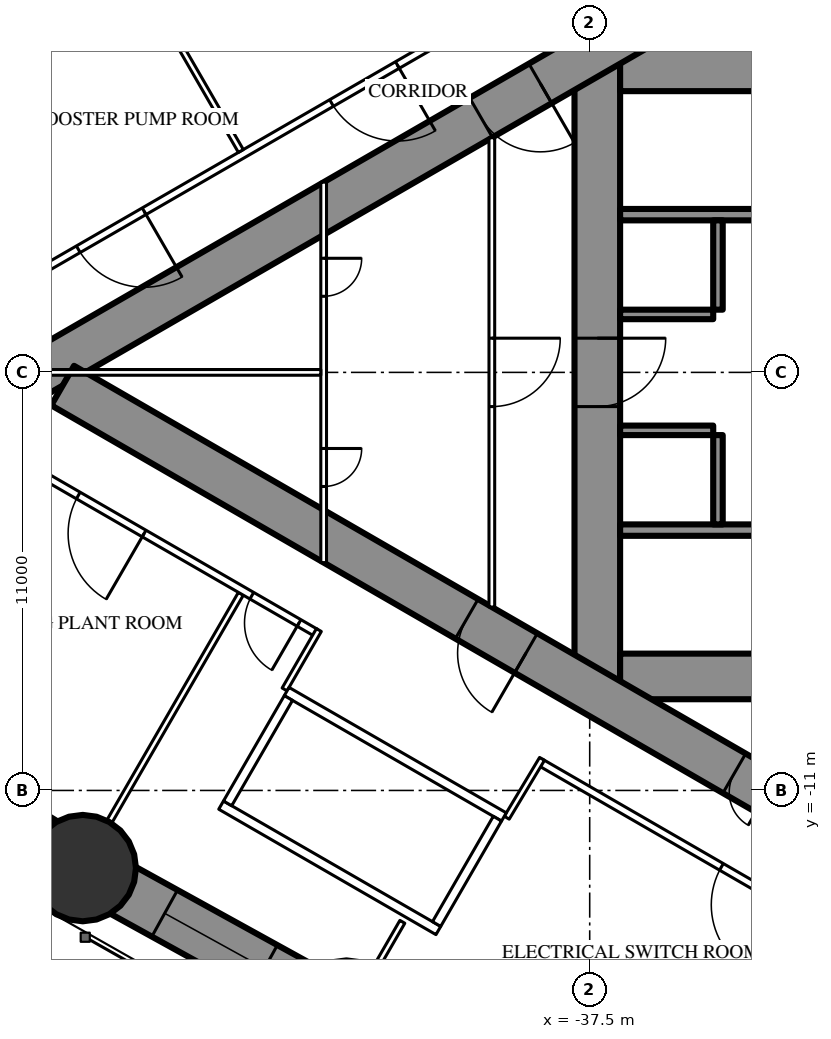
"""IFC4 building model, lengths in metres.
Left out: names, types, materials, properties, quantities, classifications, styles, units other than length and angle.
Written with IfcOpenShell. Run it as: python <this file> out.ifc"""

import sys

from ifc_helpers import new_model, si_unit, direction, frame, frame_2d, origin, origin_2d, place, context, subcontext, project, spatial, rectangle, circle, extrude, element, fill, save


model = new_model("IFC4")
c1 = context("Model", 3, precision=1e-05, world=origin(), true_north=direction((0.0, 1.0)))
c2 = subcontext(c1, "Body", "Model", "MODEL_VIEW")
j1 = project(units=[si_unit("LENGTHUNIT", "METRE"), si_unit("PLANEANGLEUNIT", "RADIAN")], contexts=[c1])
p1 = place(None, origin())
s1 = spatial("IfcSite", under=j1, at=p1, CompositionType="ELEMENT")
p2 = place(p1, origin())
s2 = spatial("IfcBuilding", under=s1, at=p2, CompositionType="ELEMENT")
p3 = place(p2, frame((0.0, 0.0, 201.8)))
s3 = spatial("IfcBuildingStorey", under=s2, at=p3, CompositionType="ELEMENT", Elevation=201.8)
p4 = place(p3, frame((-50.839, -13.043, 0.0), z_axis=(0.0, 0.0, 1.0), x_axis=(1.0, 0.0, 0.0)))
e1 = element("IfcColumn", 1, at=p4, inside=s3, PredefinedType="COLUMN", context=c2, shape_type="SweptSolid", body=[
    extrude(circle(Radius=1.4, at=origin_2d()), origin(), (0.0, 0.0, 1.0), 3.5),
])
p5 = place(p3, frame((-37.3, 8.6, 0.0), z_axis=(0.0, 0.0, 1.0), x_axis=(0.0, -1.0, 0.0)))
e2 = element("IfcWall", 2, at=p5, inside=s3, PredefinedType="SHEAR", context=c2, shape_type="SweptSolid", body=[
    extrude(rectangle(XDim=17.2, YDim=1.2, at=frame_2d((8.6, 0.0))), origin(), (0.0, 0.0, 1.0), 3.5),
])
p6 = place(p5, frame((7.7, 0.0, 0.0)))
e3 = element("IfcOpeningElement", 3, at=p6, cuts=e2, PredefinedType="OPENING", context=c2, shape_type="SweptSolid", body=[
    extrude(rectangle(XDim=1.8, YDim=2.2, at=frame_2d((0.9, 1.1))), frame((0.0, 0.61, 0.0), z_axis=(0.0, -1.0, 0.0), x_axis=(1.0, 0.0, 0.0)), (0.0, 0.0, 1.0), 1.22),
])
p7 = place(p3, frame((-28.3, 8.0, 0.0), z_axis=(0.0, 0.0, 1.0), x_axis=(-1.0, 0.0, 0.0)))
e4 = element("IfcWall", 4, at=p7, inside=s3, PredefinedType="SHEAR", context=c2, shape_type="SweptSolid", body=[
    extrude(rectangle(XDim=8.4, YDim=1.2, at=frame_2d((4.2, 0.0))), origin(), (0.0, 0.0, 1.0), 3.5),
])
p8 = place(p7, frame((0.25, 0.0, 0.0)))
e5 = element("IfcOpeningElement", 5, at=p8, cuts=e4, PredefinedType="OPENING", context=c2, shape_type="SweptSolid", body=[
    extrude(rectangle(XDim=1.0, YDim=2.2, at=frame_2d((0.5, 1.1))), frame((0.0, 0.61, 0.0), z_axis=(0.0, -1.0, 0.0), x_axis=(1.0, 0.0, 0.0)), (0.0, 0.0, 1.0), 1.22),
])
p9 = place(p3, frame((-28.3, -8.0, 0.0), z_axis=(0.0, 0.0, 1.0), x_axis=(-1.0, 0.0, 0.0)))
e6 = element("IfcWall", 6, at=p9, inside=s3, PredefinedType="SHEAR", context=c2, shape_type="SweptSolid", body=[
    extrude(rectangle(XDim=8.4, YDim=1.2, at=frame_2d((4.2, 0.0))), origin(), (0.0, 0.0, 1.0), 3.5),
])
p10 = place(p9, frame((0.25, 0.0, 0.0)))
e7 = element("IfcOpeningElement", 7, at=p10, cuts=e6, PredefinedType="OPENING", context=c2, shape_type="SweptSolid", body=[
    extrude(rectangle(XDim=1.0, YDim=2.2, at=frame_2d((0.5, 1.1))), frame((0.0, 0.61, 0.0), z_axis=(0.0, -1.0, 0.0), x_axis=(1.0, 0.0, 0.0)), (0.0, 0.0, 1.0), 1.22),
])
for number, where, z_axis, x_axis in (
    (8, (-28.3, 4.15, 0.0), (0.0, 0.0, 1.0), (-1.0, 0.0, 0.0)),
    (9, (-28.3, -4.15, 0.0), (0.0, 0.0, 1.0), (-1.0, 0.0, 0.0)),
):
    element("IfcWall", number, at=place(p3, frame(where, z_axis=z_axis, x_axis=x_axis)), inside=s3, PredefinedType="SHEAR", context=c2, shape_type="SweptSolid", body=[
        extrude(rectangle(XDim=8.4, YDim=0.3, at=frame_2d((4.2, 0.0))), origin(), (0.0, 0.0, 1.0), 3.5),
    ])
p11 = place(p3, frame((-34.125, 4.0, 0.0), z_axis=(0.0, 0.0, 1.0), x_axis=(0.0, -1.0, 0.0)))
e10 = element("IfcWall", 10, at=p11, inside=s3, PredefinedType="SHEAR", context=c2, shape_type="SweptSolid", body=[
    extrude(rectangle(XDim=2.35, YDim=0.25, at=frame_2d((1.175, 0.0))), origin(), (0.0, 0.0, 1.0), 3.5),
])
p12 = place(p3, frame((-34.25, 1.525, 0.0), z_axis=(0.0, 0.0, 1.0), x_axis=(-1.0, 0.0, 0.0)))
e11 = element("IfcWall", 11, at=p12, inside=s3, PredefinedType="SHEAR", context=c2, shape_type="SweptSolid", body=[
    extrude(rectangle(XDim=2.45, YDim=0.25, at=frame_2d((1.225, 0.0))), origin(), (0.0, 0.0, 1.0), 3.5),
])
p13 = place(p3, frame((-34.125, -1.65, 0.0), z_axis=(0.0, 0.0, 1.0), x_axis=(0.0, -1.0, 0.0)))
e12 = element("IfcWall", 12, at=p13, inside=s3, PredefinedType="SHEAR", context=c2, shape_type="SweptSolid", body=[
    extrude(rectangle(XDim=2.35, YDim=0.25, at=frame_2d((1.175, 0.0))), origin(), (0.0, 0.0, 1.0), 3.5),
])
p14 = place(p3, frame((-34.25, -1.525, 0.0), z_axis=(0.0, 0.0, 1.0), x_axis=(-1.0, 0.0, 0.0)))
e13 = element("IfcWall", 13, at=p14, inside=s3, PredefinedType="SHEAR", context=c2, shape_type="SweptSolid", body=[
    extrude(rectangle(XDim=2.45, YDim=0.25, at=frame_2d((1.225, 0.0))), origin(), (0.0, 0.0, 1.0), 3.5),
])
p15 = place(p3, frame((-27.2, 14.3, 0.0), z_axis=(0.0, 0.0, 1.0), x_axis=(-0.866026593062, -0.499997940104, 0.0)))
e14 = element("IfcWall", 14, at=p15, inside=s3, PredefinedType="SHEAR", context=c2, shape_type="SweptSolid", body=[
    extrude(rectangle(XDim=28.946, YDim=1.2, at=frame_2d((14.473, 0.0))), origin(), (0.0, 0.0, 1.0), 3.5),
])
p16 = place(p15, frame((6.5, 0.0, 0.0)))
e15 = element("IfcOpeningElement", 15, at=p16, cuts=e14, PredefinedType="OPENING", context=c2, shape_type="SweptSolid", body=[
    extrude(rectangle(XDim=1.0, YDim=2.2, at=frame_2d((0.5, 1.1))), frame((0.0, 0.61, 0.0), z_axis=(0.0, -1.0, 0.0), x_axis=(1.0, 0.0, 0.0)), (0.0, 0.0, 1.0), 1.22),
])
p17 = place(p15, frame((13.395, 0.0, 0.0)))
e16 = element("IfcOpeningElement", 16, at=p17, cuts=e14, PredefinedType="OPENING", context=c2, shape_type="SweptSolid", body=[
    extrude(rectangle(XDim=1.8, YDim=2.03, at=frame_2d((0.9, 1.015))), frame((0.0, 0.61, 0.0), z_axis=(0.0, -1.0, 0.0), x_axis=(1.0, 0.0, 0.0)), (0.0, 0.0, 1.0), 1.22),
])
p18 = place(p3, frame((-27.2, -14.3, 0.0), z_axis=(0.0, 0.0, 1.0), x_axis=(-0.866024021859, 0.500002393557, 0.0)))
e17 = element("IfcWall", 17, at=p18, inside=s3, PredefinedType="SHEAR", context=c2, shape_type="SweptSolid", body=[
    extrude(rectangle(XDim=27.907, YDim=1.2, at=frame_2d((13.954, 0.0))), origin(), (0.0, 0.0, 1.0), 3.5),
])
p19 = place(p18, frame((6.5, 0.0, 0.0)))
e18 = element("IfcOpeningElement", 18, at=p19, cuts=e17, PredefinedType="OPENING", context=c2, shape_type="SweptSolid", body=[
    extrude(rectangle(XDim=1.0, YDim=2.2, at=frame_2d((0.5, 1.1))), frame((0.0, 0.61, 0.0), z_axis=(0.0, -1.0, 0.0), x_axis=(1.0, 0.0, 0.0)), (0.0, 0.0, 1.0), 1.22),
])
p20 = place(p18, frame((13.829, 0.0, 0.0)))
e19 = element("IfcOpeningElement", 19, at=p20, cuts=e17, PredefinedType="OPENING", context=c2, shape_type="SweptSolid", body=[
    extrude(rectangle(XDim=1.8, YDim=2.2, at=frame_2d((0.9, 1.1))), frame((0.0, 0.61, 0.0), z_axis=(0.0, -1.0, 0.0), x_axis=(1.0, 0.0, 0.0)), (0.0, 0.0, 1.0), 1.22),
])
p21 = place(p3, frame((-50.839, 13.043, 0.0), z_axis=(0.0, 0.0, 1.0), x_axis=(-0.851892008043, -0.523717487423, 0.0)))
e20 = element("IfcWall", 20, at=p21, inside=s3, PredefinedType="SHEAR", context=c2, shape_type="SweptSolid", body=[
    extrude(rectangle(XDim=7.924, YDim=1.4, at=frame_2d((3.962, 0.0))), origin(), (0.0, 0.0, 1.0), 3.5),
])
p22 = place(p21, frame((2.462, 0.0, 0.6)))
e21 = element("IfcOpeningElement", 21, at=p22, cuts=e20, PredefinedType="OPENING", context=c2, shape_type="SweptSolid", body=[
    extrude(rectangle(XDim=3.0, YDim=1.2, at=frame_2d((1.5, 0.6))), frame((0.0, 0.71, 0.0), z_axis=(0.0, -1.0, 0.0), x_axis=(1.0, 0.0, 0.0)), (0.0, 0.0, 1.0), 1.42),
])
p23 = place(p3, frame((-57.59, -8.893, 0.0), z_axis=(0.0, 0.0, 1.0), x_axis=(0.851892008043, -0.523717487423, 0.0)))
e22 = element("IfcWall", 22, at=p23, inside=s3, PredefinedType="SHEAR", context=c2, shape_type="SweptSolid", body=[
    extrude(rectangle(XDim=7.924, YDim=1.4, at=frame_2d((3.962, 0.0))), origin(), (0.0, 0.0, 1.0), 3.5),
])
p24 = place(p23, frame((2.462, 0.0, 0.6)))
e23 = element("IfcOpeningElement", 23, at=p24, cuts=e22, PredefinedType="OPENING", context=c2, shape_type="SweptSolid", body=[
    extrude(rectangle(XDim=3.0, YDim=1.2, at=frame_2d((1.5, 0.6))), frame((0.0, 0.71, 0.0), z_axis=(0.0, -1.0, 0.0), x_axis=(1.0, 0.0, 0.0)), (0.0, 0.0, 1.0), 1.42),
])
p25 = place(p3, frame((-50.839, -13.043, 0.0), z_axis=(0.0, 0.0, 1.0), x_axis=(0.875577684027, -0.483077342911, 0.0)))
e24 = element("IfcWall", 24, at=p25, inside=s3, PredefinedType="SHEAR", context=c2, shape_type="SweptSolid", body=[
    extrude(rectangle(XDim=7.925, YDim=1.4, at=frame_2d((3.962, 0.0))), origin(), (0.0, 0.0, 1.0), 3.5),
])
p26 = place(p25, frame((2.462, 0.0, 0.6)))
e25 = element("IfcOpeningElement", 25, at=p26, cuts=e24, PredefinedType="OPENING", context=c2, shape_type="SweptSolid", body=[
    extrude(rectangle(XDim=3.0, YDim=1.2, at=frame_2d((1.5, 0.6))), frame((0.0, 0.71, 0.0), z_axis=(0.0, -1.0, 0.0), x_axis=(1.0, 0.0, 0.0)), (0.0, 0.0, 1.0), 1.42),
])
p27 = place(p3, frame((-27.803, 16.608, 0.0), z_axis=(0.0, 0.0, 1.0), x_axis=(-0.866025851808, -0.499999223999, 0.0)))
e26 = element("IfcWall", 26, at=p27, inside=s3, PredefinedType="PARTITIONING", context=c2, shape_type="SweptSolid", body=[
    extrude(rectangle(XDim=33.215, YDim=0.2, at=frame_2d((16.608, 0.0))), origin(), (0.0, 0.0, 1.0), 3.25),
])
p28 = place(p27, frame((5.584, 0.0, 0.0)))
e27 = element("IfcOpeningElement", 27, at=p28, cuts=e26, PredefinedType="OPENING", context=c2, shape_type="SweptSolid", body=[
    extrude(rectangle(XDim=2.0, YDim=2.4, at=frame_2d((1.0, 1.2))), frame((0.0, 0.11, 0.0), z_axis=(0.0, -1.0, 0.0), x_axis=(1.0, 0.0, 0.0)), (0.0, 0.0, 1.0), 0.22),
])
p29 = place(p27, frame((17.04, 0.0, 0.0)))
e28 = element("IfcOpeningElement", 28, at=p29, cuts=e26, PredefinedType="OPENING", context=c2, shape_type="SweptSolid", body=[
    extrude(rectangle(XDim=2.0, YDim=2.4, at=frame_2d((1.0, 1.2))), frame((0.0, 0.11, 0.0), z_axis=(0.0, -1.0, 0.0), x_axis=(1.0, 0.0, 0.0)), (0.0, 0.0, 1.0), 0.22),
])
p30 = place(p27, frame((24.735, 0.0, 0.0)))
e29 = element("IfcOpeningElement", 29, at=p30, cuts=e26, PredefinedType="OPENING", context=c2, shape_type="SweptSolid", body=[
    extrude(rectangle(XDim=2.0, YDim=2.4, at=frame_2d((1.0, 1.2))), frame((0.0, 0.11, 0.0), z_axis=(0.0, -1.0, 0.0), x_axis=(1.0, 0.0, 0.0)), (0.0, 0.0, 1.0), 0.22),
])
p31 = place(p27, frame((30.361, 0.0, 0.0)))
e30 = element("IfcOpeningElement", 30, at=p31, cuts=e26, PredefinedType="OPENING", context=c2, shape_type="SweptSolid", body=[
    extrude(rectangle(XDim=2.0, YDim=2.03, at=frame_2d((1.0, 1.015))), frame((0.0, 0.11, 0.0), z_axis=(0.0, -1.0, 0.0), x_axis=(1.0, 0.0, 0.0)), (0.0, 0.0, 1.0), 0.22),
])
for number, where, z_axis, x_axis in (
    (31, (-46.679, 5.825, 0.0), (0.0, 0.0, 1.0), (-0.5, 0.866, 0.0)),
    (32, (-46.679, -5.825, 0.0), (0.0, 0.0, 1.0), (-0.5, -0.866, 0.0)),
):
    element("IfcWall", number, at=place(p3, frame(where, z_axis=z_axis, x_axis=x_axis)), inside=s3, PredefinedType="PARTITIONING", context=c2, shape_type="SweptSolid", body=[
        extrude(rectangle(XDim=6.911, YDim=0.15, at=frame_2d((3.456, 0.0))), origin(), (0.0, 0.0, 1.0), 2.05),
    ])
p32 = place(p3, frame((-42.429, -14.457, 0.0), z_axis=(0.0, 0.0, 1.0), x_axis=(-0.5000578829, -0.865991982497, 0.0)))
e33 = element("IfcWall", 33, at=p32, inside=s3, PredefinedType="PARTITIONING", context=c2, shape_type="SweptSolid", body=[
    extrude(rectangle(XDim=1.407, YDim=0.15, at=frame_2d((0.704, 0.0))), origin(), (0.0, 0.0, 1.0), 3.25),
])
p33 = place(p3, frame((-27.803, -16.608, 0.0), z_axis=(0.0, 0.0, 1.0), x_axis=(-0.866028577512, 0.499994502903, 0.0)))
e34 = element("IfcWall", 34, at=p33, inside=s3, PredefinedType="PARTITIONING", context=c2, shape_type="SweptSolid", body=[
    extrude(rectangle(XDim=12.688, YDim=0.2, at=frame_2d((6.344, 0.0))), origin(), (0.0, 0.0, 1.0), 3.25),
])
p34 = place(p33, frame((5.194, 0.0, 0.0)))
e35 = element("IfcOpeningElement", 35, at=p34, cuts=e34, PredefinedType="OPENING", context=c2, shape_type="SweptSolid", body=[
    extrude(rectangle(XDim=2.0, YDim=2.4, at=frame_2d((1.0, 1.2))), frame((0.0, 0.11, 0.0), z_axis=(0.0, -1.0, 0.0), x_axis=(1.0, 0.0, 0.0)), (0.0, 0.0, 1.0), 0.22),
])
p35 = place(p3, frame((-44.715, -6.844, 0.0), z_axis=(0.0, 0.0, 1.0), x_axis=(-0.866025261224, 0.500000246922, 0.0)))
e36 = element("IfcWall", 36, at=p35, inside=s3, PredefinedType="PARTITIONING", context=c2, shape_type="SweptSolid", body=[
    extrude(rectangle(XDim=13.567, YDim=0.2, at=frame_2d((6.783, 0.0))), origin(), (0.0, 0.0, 1.0), 3.25),
])
p36 = place(p35, frame((10.773, 0.0, 0.0)))
e37 = element("IfcOpeningElement", 37, at=p36, cuts=e36, PredefinedType="OPENING", context=c2, shape_type="SweptSolid", body=[
    extrude(rectangle(XDim=2.0, YDim=2.03, at=frame_2d((1.0, 1.015))), frame((0.0, 0.11, 0.0), z_axis=(0.0, -1.0, 0.0), x_axis=(1.0, 0.0, 0.0)), (0.0, 0.0, 1.0), 0.22),
])
p37 = place(p35, frame((5.207, 0.0, 0.0)))
e38 = element("IfcOpeningElement", 38, at=p37, cuts=e36, PredefinedType="OPENING", context=c2, shape_type="SweptSolid", body=[
    extrude(rectangle(XDim=2.0, YDim=2.4, at=frame_2d((1.0, 1.2))), frame((0.0, 0.11, 0.0), z_axis=(0.0, -1.0, 0.0), x_axis=(1.0, 0.0, 0.0)), (0.0, 0.0, 1.0), 0.22),
])
p38 = place(p35, frame((0.5, 0.0, 0.0)))
e39 = element("IfcOpeningElement", 39, at=p38, cuts=e36, PredefinedType="OPENING", context=c2, shape_type="SweptSolid", body=[
    extrude(rectangle(XDim=1.435, YDim=2.03, at=frame_2d((0.718, 1.015))), frame((0.0, 0.11, 0.0), z_axis=(0.0, -1.0, 0.0), x_axis=(1.0, 0.0, 0.0)), (0.0, 0.0, 1.0), 0.22),
])
for number, where, z_axis, x_axis in (
    (40, (-44.626, -6.779, 0.0), (0.0, 0.0, 1.0), (-0.5, -0.866, 0.0)),
    (41, (-39.683, -11.718, 0.0), (0.0, 0.0, 1.0), (0.514, 0.858, 0.0)),
):
    element("IfcWall", number, at=place(p3, frame(where, z_axis=z_axis, x_axis=x_axis)), inside=s3, PredefinedType="PARTITIONING", context=c2, shape_type="SweptSolid", body=[
        extrude(rectangle(XDim=1.805, YDim=0.15, at=frame_2d((0.903, 0.0))), origin(), (0.0, 0.0, 1.0), 3.25),
    ])
p39 = place(p3, frame((-40.075, 6.174, 0.0), z_axis=(0.0, 0.0, 1.0), x_axis=(0.0, -1.0, 0.0)))
e42 = element("IfcWall", 42, at=p39, inside=s3, PredefinedType="PARTITIONING", context=c2, shape_type="SweptSolid", body=[
    extrude(rectangle(XDim=12.348, YDim=0.15, at=frame_2d((6.174, 0.0))), origin(), (0.0, 0.0, 1.0), 3.25),
])
p40 = place(p39, frame((5.274, 0.0, 0.0)))
e43 = element("IfcOpeningElement", 43, at=p40, cuts=e42, PredefinedType="OPENING", context=c2, shape_type="SweptSolid", body=[
    extrude(rectangle(XDim=1.8, YDim=2.2, at=frame_2d((0.9, 1.1))), frame((0.0, 0.085, 0.0), z_axis=(0.0, -1.0, 0.0), x_axis=(1.0, 0.0, 0.0)), (0.0, 0.0, 1.0), 0.17),
])
p41 = place(p3, frame((-44.5, 5.005, 0.0), z_axis=(0.0, 0.0, 1.0), x_axis=(0.0, -1.0, 0.0)))
e44 = element("IfcWall", 44, at=p41, inside=s3, PredefinedType="PARTITIONING", context=c2, shape_type="SweptSolid", body=[
    extrude(rectangle(XDim=10.009, YDim=0.15, at=frame_2d((5.005, 0.0))), origin(), (0.0, 0.0, 1.0), 3.25),
])
p42 = place(p41, frame((2.002, 0.0, 0.0)))
e45 = element("IfcOpeningElement", 45, at=p42, cuts=e44, PredefinedType="OPENING", context=c2, shape_type="SweptSolid", body=[
    extrude(rectangle(XDim=1.0, YDim=2.2, at=frame_2d((0.5, 1.1))), frame((0.0, 0.085, 0.0), z_axis=(0.0, -1.0, 0.0), x_axis=(1.0, 0.0, 0.0)), (0.0, 0.0, 1.0), 0.17),
])
p43 = place(p41, frame((7.007, 0.0, 0.0)))
e46 = element("IfcOpeningElement", 46, at=p43, cuts=e44, PredefinedType="OPENING", context=c2, shape_type="SweptSolid", body=[
    extrude(rectangle(XDim=1.0, YDim=2.2, at=frame_2d((0.5, 1.1))), frame((0.0, 0.085, 0.0), z_axis=(0.0, -1.0, 0.0), x_axis=(1.0, 0.0, 0.0)), (0.0, 0.0, 1.0), 0.17),
])
p44 = place(p3, frame((-44.575, 0.0, 0.0), z_axis=(0.0, 0.0, 1.0), x_axis=(-1.0, 0.0, 0.0)))
e47 = element("IfcWall", 47, at=p44, inside=s3, PredefinedType="PARTITIONING", context=c2, shape_type="SweptSolid", body=[
    extrude(rectangle(XDim=8.593, YDim=0.15, at=frame_2d((4.297, 0.0))), origin(), (0.0, 0.0, 1.0), 2.05),
])
p45 = place(p3, frame((-39.758, -11.697, 0.0), z_axis=(0.0, 0.0, 1.0), x_axis=(-0.866024194504, 0.500002094529, 0.0)))
e48 = element("IfcWall", 48, at=p45, inside=s3, PredefinedType="PARTITIONING", context=c2, shape_type="SweptSolid", body=[
    extrude(rectangle(XDim=6.6, YDim=0.25, at=frame_2d((3.3, 0.0))), origin(), (0.0, 0.0, 1.0), 3.25),
])
p46 = place(p3, frame((-41.482, -14.686, 0.0), z_axis=(0.0, 0.0, 1.0), x_axis=(-0.86603344179, 0.499986077507, 0.0)))
e49 = element("IfcWall", 49, at=p46, inside=s3, PredefinedType="PARTITIONING", context=c2, shape_type="SweptSolid", body=[
    extrude(rectangle(XDim=6.6, YDim=0.25, at=frame_2d((3.3, 0.0))), origin(), (0.0, 0.0, 1.0), 3.25),
])
for number, where, z_axis, x_axis in (
    (50, (-39.928, -11.743, 0.0), (0.0, 0.0, 1.0), (-0.5, -0.866, 0.0)),
    (51, (-45.428, -8.568, 0.0), (0.0, 0.0, 1.0), (-0.5, -0.866, 0.0)),
):
    element("IfcWall", number, at=place(p3, frame(where, z_axis=z_axis, x_axis=x_axis)), inside=s3, PredefinedType="PARTITIONING", context=c2, shape_type="SweptSolid", body=[
        extrude(rectangle(XDim=3.201, YDim=0.25, at=frame_2d((1.6, 0.0))), origin(), (0.0, 0.0, 1.0), 3.25),
    ])
p47 = place(p26, origin())
e52 = element("IfcWindow", 52, at=p47, inside=s3, PartitioningType="SINGLE_PANEL", PredefinedType="WINDOW", context=c2, shape_type="SweptSolid", body=[
    extrude(rectangle(XDim=3.0, YDim=1.2, at=frame_2d((1.5, 0.6))), frame((0.0, 0.03, 0.0), z_axis=(0.0, -1.0, 0.0), x_axis=(1.0, 0.0, 0.0)), (0.0, 0.0, 1.0), 0.06),
])
fill(e25, e52)
p48 = place(p29, origin())
e53 = element("IfcDoor", 53, at=p48, inside=s3, OperationType="DOUBLE_DOOR_SINGLE_SWING", PredefinedType="DOOR", context=c2, shape_type="SweptSolid", body=[
    extrude(rectangle(XDim=2.0, YDim=2.4, at=frame_2d((1.0, 1.2))), frame((0.0, 0.025, 0.0), z_axis=(0.0, -1.0, 0.0), x_axis=(1.0, 0.0, 0.0)), (0.0, 0.0, 1.0), 0.05),
])
fill(e28, e53)
p49 = place(p30, origin())
e54 = element("IfcDoor", 54, at=p49, inside=s3, OperationType="DOUBLE_DOOR_SINGLE_SWING", PredefinedType="DOOR", context=c2, shape_type="SweptSolid", body=[
    extrude(rectangle(XDim=2.0, YDim=2.4, at=frame_2d((1.0, 1.2))), frame((0.0, 0.025, 0.0), z_axis=(0.0, -1.0, 0.0), x_axis=(1.0, 0.0, 0.0)), (0.0, 0.0, 1.0), 0.05),
])
fill(e29, e54)
p50 = place(p37, origin())
e55 = element("IfcDoor", 55, at=p50, inside=s3, OperationType="DOUBLE_DOOR_SINGLE_SWING", PredefinedType="DOOR", context=c2, shape_type="SweptSolid", body=[
    extrude(rectangle(XDim=2.0, YDim=2.4, at=frame_2d((1.0, 1.2))), frame((0.0, 0.025, 0.0), z_axis=(0.0, -1.0, 0.0), x_axis=(1.0, 0.0, 0.0)), (0.0, 0.0, 1.0), 0.05),
])
fill(e38, e55)
p51 = place(p38, origin())
e56 = element("IfcDoor", 56, at=p51, inside=s3, OperationType="SINGLE_SWING_LEFT", PredefinedType="DOOR", context=c2, shape_type="SweptSolid", body=[
    extrude(rectangle(XDim=1.435, YDim=2.03, at=frame_2d((0.718, 1.015))), frame((0.0, 0.025, 0.0), z_axis=(0.0, -1.0, 0.0), x_axis=(1.0, 0.0, 0.0)), (0.0, 0.0, 1.0), 0.05),
])
fill(e39, e56)
p52 = place(p34, origin())
e57 = element("IfcDoor", 57, at=p52, inside=s3, OperationType="DOUBLE_DOOR_SINGLE_SWING", PredefinedType="DOOR", context=c2, shape_type="SweptSolid", body=[
    extrude(rectangle(XDim=2.0, YDim=2.4, at=frame_2d((1.0, 1.2))), frame((0.0, 0.025, 0.0), z_axis=(0.0, -1.0, 0.0), x_axis=(1.0, 0.0, 0.0)), (0.0, 0.0, 1.0), 0.05),
])
fill(e35, e57)
p53 = place(p40, origin())
e58 = element("IfcDoor", 58, at=p53, inside=s3, OperationType="DOUBLE_DOOR_SINGLE_SWING", PredefinedType="DOOR", context=c2, shape_type="SweptSolid", body=[
    extrude(rectangle(XDim=1.8, YDim=2.2, at=frame_2d((0.9, 1.1))), frame((0.0, 0.025, 0.0), z_axis=(0.0, -1.0, 0.0), x_axis=(1.0, 0.0, 0.0)), (0.0, 0.0, 1.0), 0.05),
])
fill(e43, e58)
p54 = place(p42, origin())
e59 = element("IfcDoor", 59, at=p54, inside=s3, OperationType="SINGLE_SWING_LEFT", PredefinedType="DOOR", context=c2, shape_type="SweptSolid", body=[
    extrude(rectangle(XDim=1.0, YDim=2.2, at=frame_2d((0.5, 1.1))), frame((0.0, 0.025, 0.0), z_axis=(0.0, -1.0, 0.0), x_axis=(1.0, 0.0, 0.0)), (0.0, 0.0, 1.0), 0.05),
])
fill(e45, e59)
p55 = place(p43, origin())
e60 = element("IfcDoor", 60, at=p55, inside=s3, OperationType="SINGLE_SWING_LEFT", PredefinedType="DOOR", context=c2, shape_type="SweptSolid", body=[
    extrude(rectangle(XDim=1.0, YDim=2.2, at=frame_2d((0.5, 1.1))), frame((0.0, 0.025, 0.0), z_axis=(0.0, -1.0, 0.0), x_axis=(1.0, 0.0, 0.0)), (0.0, 0.0, 1.0), 0.05),
])
fill(e46, e60)
p56 = place(p17, origin())
e61 = element("IfcDoor", 61, at=p56, inside=s3, OperationType="DOUBLE_DOOR_SINGLE_SWING", PredefinedType="DOOR", context=c2, shape_type="SweptSolid", body=[
    extrude(rectangle(XDim=1.8, YDim=2.03, at=frame_2d((0.9, 1.015))), frame((0.0, 0.025, 0.0), z_axis=(0.0, -1.0, 0.0), x_axis=(1.0, 0.0, 0.0)), (0.0, 0.0, 1.0), 0.05),
])
fill(e16, e61)
p57 = place(p19, origin())
e62 = element("IfcDoor", 62, at=p57, inside=s3, OperationType="SINGLE_SWING_LEFT", PredefinedType="DOOR", context=c2, shape_type="SweptSolid", body=[
    extrude(rectangle(XDim=1.0, YDim=2.2, at=frame_2d((0.5, 1.1))), frame((0.0, 0.025, 0.0), z_axis=(0.0, -1.0, 0.0), x_axis=(1.0, 0.0, 0.0)), (0.0, 0.0, 1.0), 0.05),
])
fill(e18, e62)
p58 = place(p20, origin())
e63 = element("IfcDoor", 63, at=p58, inside=s3, OperationType="DOUBLE_DOOR_SINGLE_SWING", PredefinedType="DOOR", context=c2, shape_type="SweptSolid", body=[
    extrude(rectangle(XDim=1.8, YDim=2.2, at=frame_2d((0.9, 1.1))), frame((0.0, 0.025, 0.0), z_axis=(0.0, -1.0, 0.0), x_axis=(1.0, 0.0, 0.0)), (0.0, 0.0, 1.0), 0.05),
])
fill(e19, e63)
p59 = place(p6, origin())
e64 = element("IfcDoor", 64, at=p59, inside=s3, OperationType="DOUBLE_DOOR_SINGLE_SWING", PredefinedType="DOOR", context=c2, shape_type="SweptSolid", body=[
    extrude(rectangle(XDim=1.8, YDim=2.2, at=frame_2d((0.9, 1.1))), frame((0.0, 0.025, 0.0), z_axis=(0.0, -1.0, 0.0), x_axis=(1.0, 0.0, 0.0)), (0.0, 0.0, 1.0), 0.05),
])
fill(e3, e64)
save(model, sys.argv[1])
